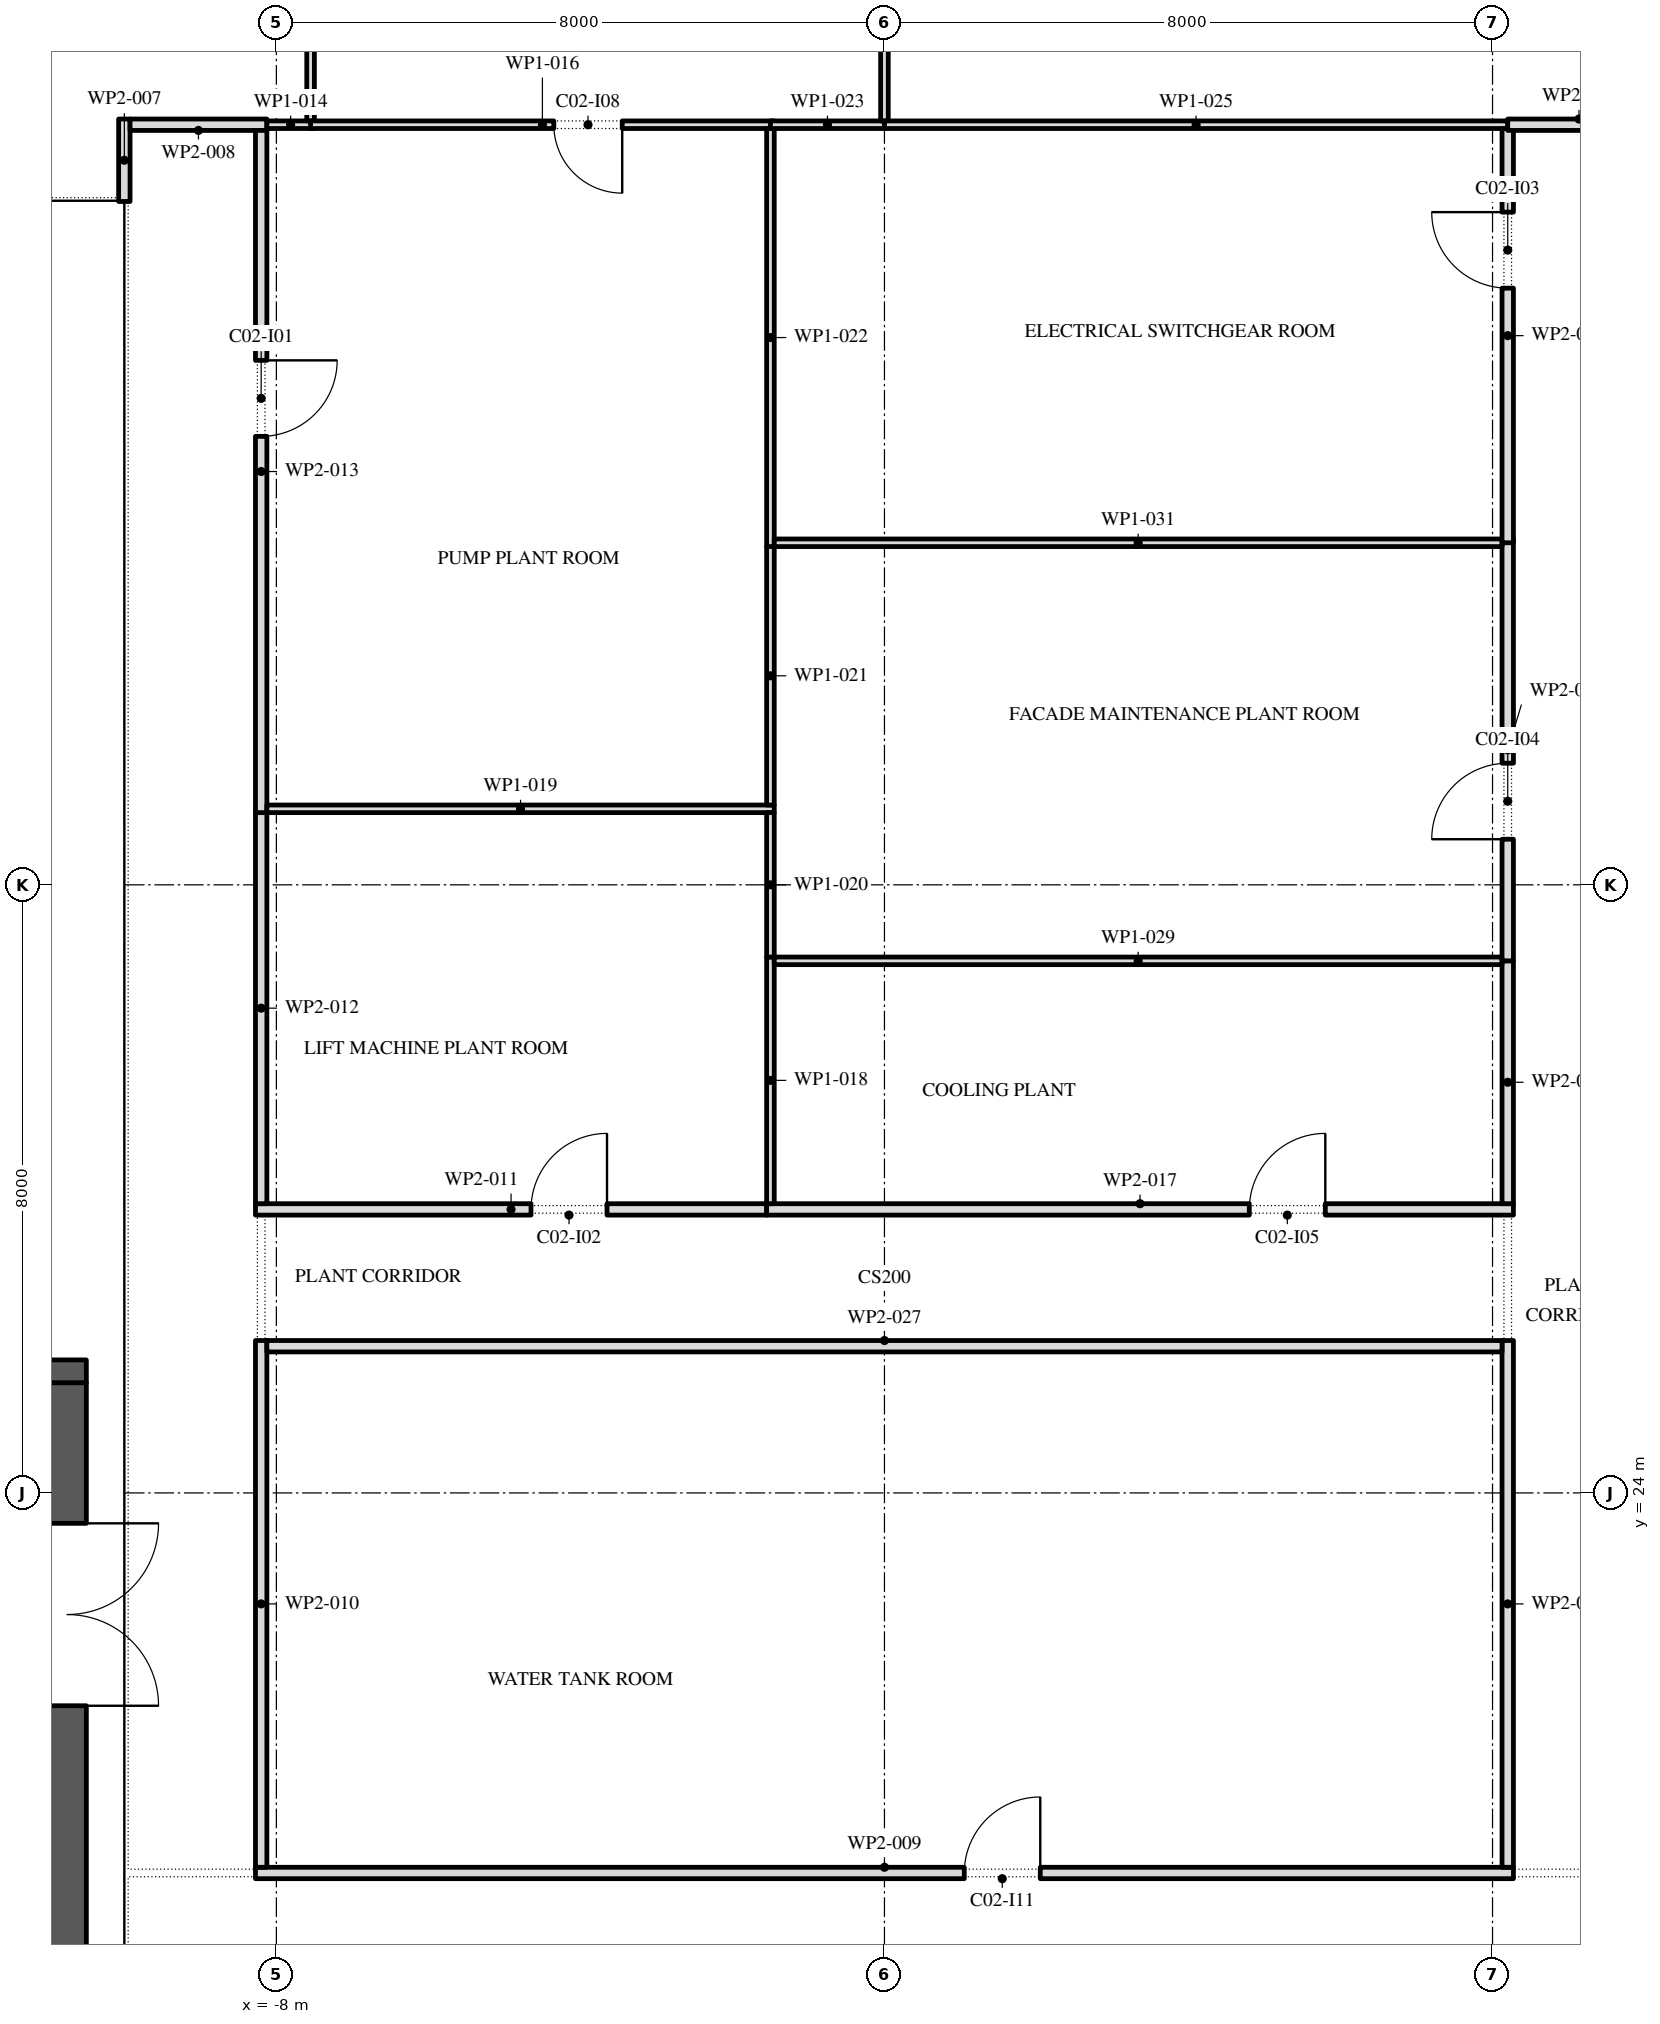
"""IFC4 building model, lengths in metres.
Left out: names, types, materials, properties, quantities, classifications, styles, units other than length and angle.
Written with IfcOpenShell. Run it as: python <this file> out.ifc"""

import sys

from ifc_helpers import new_model, si_unit, direction, frame, frame_2d, origin, place, context, subcontext, project, spatial, rectangle, extrude, element, fill, save


model = new_model("IFC4")
c1 = context("Model", 3, precision=1e-05, world=origin(), true_north=direction((0.0, 1.0)))
c2 = subcontext(c1, "Body", "Model", "MODEL_VIEW")
j1 = project(units=[si_unit("LENGTHUNIT", "METRE"), si_unit("PLANEANGLEUNIT", "RADIAN")], contexts=[c1])
p1 = place(None, origin())
s1 = spatial("IfcSite", under=j1, at=p1, CompositionType="ELEMENT")
p2 = place(p1, origin())
s2 = spatial("IfcBuilding", under=s1, at=p2, CompositionType="ELEMENT")
p3 = place(p2, frame((0.0, 0.0, 373.2)))
s3 = spatial("IfcBuildingStorey", under=s2, at=p3, CompositionType="ELEMENT", Elevation=373.2)
p4 = place(p3, frame((-10.75, -2.45, 0.0), z_axis=(0.0, 0.0, 1.0), x_axis=(0.0, 1.0, 0.0)))
e1 = element("IfcWall", 1, at=p4, inside=s3, PredefinedType="SHEAR", context=c2, shape_type="SweptSolid", body=[
    extrude(rectangle(XDim=27.9, YDim=0.5, at=frame_2d((13.95, 0.0))), origin(), (0.0, 0.0, 1.0), 4.0),
])
p5 = place(p4, frame((23.65, 0.0, 0.0)))
e2 = element("IfcOpeningElement", 2, at=p5, cuts=e1, PredefinedType="OPENING", context=c2, shape_type="SweptSolid", body=[
    extrude(rectangle(XDim=2.4, YDim=2.1, at=frame_2d((1.2, 1.05))), frame((0.0, 0.26, 0.0), z_axis=(0.0, -1.0, 0.0), x_axis=(1.0, 0.0, 0.0)), (0.0, 0.0, 1.0), 0.52),
])
p6 = place(p4, frame((1.087, 0.0, 0.0)))
e3 = element("IfcOpeningElement", 3, at=p6, cuts=e1, PredefinedType="OPENING", context=c2, shape_type="SweptSolid", body=[
    extrude(rectangle(XDim=0.9, YDim=2.1, at=frame_2d((0.45, 1.05))), frame((0.0, 0.26, 0.0), z_axis=(0.0, -1.0, 0.0), x_axis=(1.0, 0.0, 0.0)), (0.0, 0.0, 1.0), 0.52),
])
p7 = place(p4, frame((4.262, 0.0, 0.0)))
e4 = element("IfcOpeningElement", 4, at=p7, cuts=e1, PredefinedType="OPENING", context=c2, shape_type="SweptSolid", body=[
    extrude(rectangle(XDim=1.0, YDim=2.1, at=frame_2d((0.5, 1.05))), frame((0.0, 0.26, 0.0), z_axis=(0.0, -1.0, 0.0), x_axis=(1.0, 0.0, 0.0)), (0.0, 0.0, 1.0), 0.52),
])
p8 = place(p3, frame((-21.5, 25.6, 0.0), z_axis=(0.0, 0.0, 1.0), x_axis=(1.0, 0.0, 0.0)))
e5 = element("IfcWall", 5, at=p8, inside=s3, PredefinedType="SHEAR", context=c2, shape_type="SweptSolid", body=[
    extrude(rectangle(XDim=11.0, YDim=0.3, at=frame_2d((5.5, 0.0))), origin(), (0.0, 0.0, 1.0), 4.0),
])
p9 = place(p3, frame((-10.0, 40.99, 0.0), z_axis=(0.0, 0.0, 1.0), x_axis=(0.0, 1.0, 0.0)))
e6 = element("IfcWall", 6, at=p9, inside=s3, PredefinedType="PARTITIONING", context=c2, shape_type="SweptSolid", body=[
    extrude(rectangle(XDim=1.085, YDim=0.15, at=frame_2d((0.542, 0.0))), origin(), (0.0, 0.0, 1.0), 4.0),
])
p10 = place(p3, frame((-9.925, 42.0, 0.0), z_axis=(0.0, 0.0, 1.0), x_axis=(1.0, 0.0, 0.0)))
e7 = element("IfcWall", 7, at=p10, inside=s3, PredefinedType="PARTITIONING", context=c2, shape_type="SweptSolid", body=[
    extrude(rectangle(XDim=1.8, YDim=0.15, at=frame_2d((0.9, 0.0))), origin(), (0.0, 0.0, 1.0), 4.0),
])
p11 = place(p3, frame((-8.275, 19.0, 0.0), z_axis=(0.0, 0.0, 1.0), x_axis=(1.0, 0.0, 0.0)))
e8 = element("IfcWall", 8, at=p11, inside=s3, PredefinedType="PARTITIONING", context=c2, shape_type="SweptSolid", body=[
    extrude(rectangle(XDim=16.55, YDim=0.15, at=frame_2d((8.275, 0.0))), origin(), (0.0, 0.0, 1.0), 4.0),
])
p12 = place(p11, frame((9.325, 0.0, 0.0)))
e9 = element("IfcOpeningElement", 9, at=p12, cuts=e8, PredefinedType="OPENING", context=c2, shape_type="SweptSolid", body=[
    extrude(rectangle(XDim=1.0, YDim=2.1, at=frame_2d((0.5, 1.05))), frame((0.0, 0.085, 0.0), z_axis=(0.0, -1.0, 0.0), x_axis=(1.0, 0.0, 0.0)), (0.0, 0.0, 1.0), 0.17),
])
p13 = place(p3, frame((-8.2, 26.005, 0.0), z_axis=(0.0, 0.0, 1.0), x_axis=(0.0, -1.0, 0.0)))
e10 = element("IfcWall", 10, at=p13, inside=s3, PredefinedType="PARTITIONING", context=c2, shape_type="SweptSolid", body=[
    extrude(rectangle(XDim=6.93, YDim=0.15, at=frame_2d((3.465, 0.0))), origin(), (0.0, 0.0, 1.0), 4.0),
])
p14 = place(p3, frame((-8.275, 27.73, 0.0), z_axis=(0.0, 0.0, 1.0), x_axis=(1.0, 0.0, 0.0)))
e11 = element("IfcWall", 11, at=p14, inside=s3, PredefinedType="PARTITIONING", context=c2, shape_type="SweptSolid", body=[
    extrude(rectangle(XDim=6.725, YDim=0.15, at=frame_2d((3.362, 0.0))), origin(), (0.0, 0.0, 1.0), 4.0),
])
p15 = place(p14, frame((3.625, 0.0, 0.0)))
e12 = element("IfcOpeningElement", 12, at=p15, cuts=e11, PredefinedType="OPENING", context=c2, shape_type="SweptSolid", body=[
    extrude(rectangle(XDim=1.0, YDim=2.1, at=frame_2d((0.5, 1.05))), frame((0.0, 0.085, 0.0), z_axis=(0.0, -1.0, 0.0), x_axis=(1.0, 0.0, 0.0)), (0.0, 0.0, 1.0), 0.17),
])
p16 = place(p3, frame((-8.2, 32.95, 0.0), z_axis=(0.0, 0.0, 1.0), x_axis=(0.0, -1.0, 0.0)))
e13 = element("IfcWall", 13, at=p16, inside=s3, PredefinedType="PARTITIONING", context=c2, shape_type="SweptSolid", body=[
    extrude(rectangle(XDim=5.145, YDim=0.15, at=frame_2d((2.573, 0.0))), origin(), (0.0, 0.0, 1.0), 4.0),
])
p17 = place(p3, frame((-8.2, 41.925, 0.0), z_axis=(0.0, 0.0, 1.0), x_axis=(0.0, -1.0, 0.0)))
e14 = element("IfcWall", 14, at=p17, inside=s3, PredefinedType="PARTITIONING", context=c2, shape_type="SweptSolid", body=[
    extrude(rectangle(XDim=8.975, YDim=0.15, at=frame_2d((4.488, 0.0))), origin(), (0.0, 0.0, 1.0), 4.0),
])
p18 = place(p17, frame((3.025, 0.0, 0.0)))
e15 = element("IfcOpeningElement", 15, at=p18, cuts=e14, PredefinedType="OPENING", context=c2, shape_type="SweptSolid", body=[
    extrude(rectangle(XDim=1.0, YDim=2.1, at=frame_2d((0.5, 1.05))), frame((0.0, 0.085, 0.0), z_axis=(0.0, -1.0, 0.0), x_axis=(1.0, 0.0, 0.0)), (0.0, 0.0, 1.0), 0.17),
])
p19 = place(p3, frame((-8.125, 42.0, 0.0), z_axis=(0.0, 0.0, 1.0), x_axis=(1.0, 0.0, 0.0)))
e16 = element("IfcWall", 16, at=p19, inside=s3, PredefinedType="PARTITIONING", context=c2, shape_type="SweptSolid", body=[
    extrude(rectangle(XDim=0.625, YDim=0.1, at=frame_2d((0.312, 0.0))), origin(), (0.0, 0.0, 1.0), 4.0),
])
p20 = place(p3, frame((-7.55, 42.05, 0.0), z_axis=(0.0, 0.0, 1.0), x_axis=(0.0, 1.0, 0.0)))
e17 = element("IfcWall", 17, at=p20, inside=s3, PredefinedType="PARTITIONING", context=c2, shape_type="SweptSolid", body=[
    extrude(rectangle(XDim=8.378, YDim=0.1, at=frame_2d((4.189, 0.0))), origin(), (0.0, 0.0, 1.0), 4.0),
])
p21 = place(p3, frame((-7.55, 42.0, 0.0), z_axis=(0.0, 0.0, 1.0), x_axis=(1.0, 0.0, 0.0)))
e18 = element("IfcWall", 18, at=p21, inside=s3, PredefinedType="PARTITIONING", context=c2, shape_type="SweptSolid", body=[
    extrude(rectangle(XDim=6.1, YDim=0.1, at=frame_2d((3.05, 0.0))), origin(), (0.0, 0.0, 1.0), 4.0),
])
p22 = place(p21, frame((3.2, 0.0, 0.0)))
e19 = element("IfcOpeningElement", 19, at=p22, cuts=e18, PredefinedType="OPENING", context=c2, shape_type="SweptSolid", body=[
    extrude(rectangle(XDim=0.9, YDim=2.1, at=frame_2d((0.45, 1.05))), frame((0.0, 0.06, 0.0), z_axis=(0.0, -1.0, 0.0), x_axis=(1.0, 0.0, 0.0)), (0.0, 0.0, 1.0), 0.12),
])
p23 = place(p3, frame((-1.55, 27.73, 0.0), z_axis=(0.0, 0.0, 1.0), x_axis=(1.0, 0.0, 0.0)))
e20 = element("IfcWall", 20, at=p23, inside=s3, PredefinedType="PARTITIONING", context=c2, shape_type="SweptSolid", body=[
    extrude(rectangle(XDim=9.825, YDim=0.15, at=frame_2d((4.913, 0.0))), origin(), (0.0, 0.0, 1.0), 4.0),
])
p24 = place(p23, frame((6.35, 0.0, 0.0)))
e21 = element("IfcOpeningElement", 21, at=p24, cuts=e20, PredefinedType="OPENING", context=c2, shape_type="SweptSolid", body=[
    extrude(rectangle(XDim=1.0, YDim=2.1, at=frame_2d((0.5, 1.05))), frame((0.0, 0.085, 0.0), z_axis=(0.0, -1.0, 0.0), x_axis=(1.0, 0.0, 0.0)), (0.0, 0.0, 1.0), 0.17),
])
p25 = place(p3, frame((-1.5, 31.05, 0.0), z_axis=(0.0, 0.0, 1.0), x_axis=(0.0, -1.0, 0.0)))
e22 = element("IfcWall", 22, at=p25, inside=s3, PredefinedType="PARTITIONING", context=c2, shape_type="SweptSolid", body=[
    extrude(rectangle(XDim=3.245, YDim=0.1, at=frame_2d((1.623, 0.0))), origin(), (0.0, 0.0, 1.0), 4.0),
])
p26 = place(p3, frame((-1.45, 33.0, 0.0), z_axis=(0.0, 0.0, 1.0), x_axis=(-1.0, 0.0, 0.0)))
e23 = element("IfcWall", 23, at=p26, inside=s3, PredefinedType="PARTITIONING", context=c2, shape_type="SweptSolid", body=[
    extrude(rectangle(XDim=6.675, YDim=0.1, at=frame_2d((3.337, 0.0))), origin(), (0.0, 0.0, 1.0), 4.0),
])
p27 = place(p3, frame((-1.5, 32.95, 0.0), z_axis=(0.0, 0.0, 1.0), x_axis=(0.0, -1.0, 0.0)))
e24 = element("IfcWall", 24, at=p27, inside=s3, PredefinedType="PARTITIONING", context=c2, shape_type="SweptSolid", body=[
    extrude(rectangle(XDim=1.9, YDim=0.1, at=frame_2d((0.95, 0.0))), origin(), (0.0, 0.0, 1.0), 4.0),
])
p28 = place(p3, frame((-1.5, 36.45, 0.0), z_axis=(0.0, 0.0, 1.0), x_axis=(0.0, -1.0, 0.0)))
e25 = element("IfcWall", 25, at=p28, inside=s3, PredefinedType="PARTITIONING", context=c2, shape_type="SweptSolid", body=[
    extrude(rectangle(XDim=3.4, YDim=0.1, at=frame_2d((1.7, 0.0))), origin(), (0.0, 0.0, 1.0), 4.0),
])
p29 = place(p3, frame((-1.5, 41.95, 0.0), z_axis=(0.0, 0.0, 1.0), x_axis=(0.0, -1.0, 0.0)))
e26 = element("IfcWall", 26, at=p29, inside=s3, PredefinedType="PARTITIONING", context=c2, shape_type="SweptSolid", body=[
    extrude(rectangle(XDim=5.5, YDim=0.1, at=frame_2d((2.75, 0.0))), origin(), (0.0, 0.0, 1.0), 4.0),
])
p30 = place(p3, frame((-1.5, 42.0, 0.0), z_axis=(0.0, 0.0, 1.0), x_axis=(1.0, 0.0, 0.0)))
e27 = element("IfcWall", 27, at=p30, inside=s3, PredefinedType="PARTITIONING", context=c2, shape_type="SweptSolid", body=[
    extrude(rectangle(XDim=1.5, YDim=0.1, at=frame_2d((0.75, 0.0))), origin(), (0.0, 0.0, 1.0), 4.0),
])
p31 = place(p3, frame((0.0, 42.05, 0.0), z_axis=(0.0, 0.0, 1.0), x_axis=(0.0, 1.0, 0.0)))
e28 = element("IfcWall", 28, at=p31, inside=s3, PredefinedType="PARTITIONING", context=c2, shape_type="SweptSolid", body=[
    extrude(rectangle(XDim=8.378, YDim=0.1, at=frame_2d((4.189, 0.0))), origin(), (0.0, 0.0, 1.0), 4.0),
])
p32 = place(p3, frame((0.0, 42.0, 0.0), z_axis=(0.0, 0.0, 1.0), x_axis=(1.0, 0.0, 0.0)))
e29 = element("IfcWall", 29, at=p32, inside=s3, PredefinedType="PARTITIONING", context=c2, shape_type="SweptSolid", body=[
    extrude(rectangle(XDim=8.2, YDim=0.1, at=frame_2d((4.1, 0.0))), origin(), (0.0, 0.0, 1.0), 4.0),
])
p33 = place(p3, frame((8.2, 19.075, 0.0), z_axis=(0.0, 0.0, 1.0), x_axis=(0.0, 1.0, 0.0)))
e30 = element("IfcWall", 30, at=p33, inside=s3, PredefinedType="PARTITIONING", context=c2, shape_type="SweptSolid", body=[
    extrude(rectangle(XDim=6.93, YDim=0.15, at=frame_2d((3.465, 0.0))), origin(), (0.0, 0.0, 1.0), 4.0),
])
p34 = place(p3, frame((8.125, 25.93, 0.0), z_axis=(0.0, 0.0, 1.0), x_axis=(-1.0, 0.0, 0.0)))
e31 = element("IfcWall", 31, at=p34, inside=s3, PredefinedType="PARTITIONING", context=c2, shape_type="SweptSolid", body=[
    extrude(rectangle(XDim=16.25, YDim=0.15, at=frame_2d((8.125, 0.0))), origin(), (0.0, 0.0, 1.0), 4.0),
])
p35 = place(p3, frame((8.2, 27.805, 0.0), z_axis=(0.0, 0.0, 1.0), x_axis=(0.0, 1.0, 0.0)))
e32 = element("IfcWall", 32, at=p35, inside=s3, PredefinedType="PARTITIONING", context=c2, shape_type="SweptSolid", body=[
    extrude(rectangle(XDim=3.195, YDim=0.15, at=frame_2d((1.598, 0.0))), origin(), (0.0, 0.0, 1.0), 4.0),
])
p36 = place(p3, frame((8.125, 31.0, 0.0), z_axis=(0.0, 0.0, 1.0), x_axis=(-1.0, 0.0, 0.0)))
e33 = element("IfcWall", 33, at=p36, inside=s3, PredefinedType="PARTITIONING", context=c2, shape_type="SweptSolid", body=[
    extrude(rectangle(XDim=9.575, YDim=0.1, at=frame_2d((4.788, 0.0))), origin(), (0.0, 0.0, 1.0), 4.0),
])
p37 = place(p3, frame((8.2, 31.0, 0.0), z_axis=(0.0, 0.0, 1.0), x_axis=(0.0, 1.0, 0.0)))
e34 = element("IfcWall", 34, at=p37, inside=s3, PredefinedType="PARTITIONING", context=c2, shape_type="SweptSolid", body=[
    extrude(rectangle(XDim=5.55, YDim=0.15, at=frame_2d((2.775, 0.0))), origin(), (0.0, 0.0, 1.0), 4.0),
])
p38 = place(p37, frame((1.6, 0.0, 0.0)))
e35 = element("IfcOpeningElement", 35, at=p38, cuts=e34, PredefinedType="OPENING", context=c2, shape_type="SweptSolid", body=[
    extrude(rectangle(XDim=1.0, YDim=2.1, at=frame_2d((0.5, 1.05))), frame((0.0, 0.085, 0.0), z_axis=(0.0, -1.0, 0.0), x_axis=(1.0, 0.0, 0.0)), (0.0, 0.0, 1.0), 0.17),
])
p39 = place(p3, frame((8.125, 36.5, 0.0), z_axis=(0.0, 0.0, 1.0), x_axis=(-1.0, 0.0, 0.0)))
e36 = element("IfcWall", 36, at=p39, inside=s3, PredefinedType="PARTITIONING", context=c2, shape_type="SweptSolid", body=[
    extrude(rectangle(XDim=9.575, YDim=0.1, at=frame_2d((4.788, 0.0))), origin(), (0.0, 0.0, 1.0), 4.0),
])
p40 = place(p3, frame((8.2, 36.5, 0.0), z_axis=(0.0, 0.0, 1.0), x_axis=(0.0, 1.0, 0.0)))
e37 = element("IfcWall", 37, at=p40, inside=s3, PredefinedType="PARTITIONING", context=c2, shape_type="SweptSolid", body=[
    extrude(rectangle(XDim=5.45, YDim=0.15, at=frame_2d((2.725, 0.0))), origin(), (0.0, 0.0, 1.0), 4.0),
])
p41 = place(p40, frame((3.35, 0.0, 0.0)))
e38 = element("IfcOpeningElement", 38, at=p41, cuts=e37, PredefinedType="OPENING", context=c2, shape_type="SweptSolid", body=[
    extrude(rectangle(XDim=1.0, YDim=2.1, at=frame_2d((0.5, 1.05))), frame((0.0, 0.085, 0.0), z_axis=(0.0, -1.0, 0.0), x_axis=(1.0, 0.0, 0.0)), (0.0, 0.0, 1.0), 0.17),
])
p42 = place(p3, frame((8.2, 42.0, 0.0), z_axis=(0.0, 0.0, 1.0), x_axis=(1.0, 0.0, 0.0)))
e39 = element("IfcWall", 39, at=p42, inside=s3, PredefinedType="PARTITIONING", context=c2, shape_type="SweptSolid", body=[
    extrude(rectangle(XDim=1.875, YDim=0.15, at=frame_2d((0.938, 0.0))), origin(), (0.0, 0.0, 1.0), 4.0),
])
p43 = place(p5, frame((2.4, 0.0, 0.0), z_axis=(0.0, 0.0, 1.0), x_axis=(-1.0, 0.0, 0.0)))
e40 = element("IfcDoor", 40, at=p43, inside=s3, OperationType="DOUBLE_DOOR_SINGLE_SWING", PredefinedType="DOOR", context=c2, shape_type="SweptSolid", body=[
    extrude(rectangle(XDim=2.4, YDim=2.1, at=frame_2d((1.2, 1.05))), frame((0.0, 0.025, 0.0), z_axis=(0.0, -1.0, 0.0), x_axis=(1.0, 0.0, 0.0)), (0.0, 0.0, 1.0), 0.05),
])
fill(e2, e40)
p44 = place(p18, origin())
e41 = element("IfcDoor", 41, at=p44, inside=s3, OperationType="SINGLE_SWING_RIGHT", PredefinedType="DOOR", context=c2, shape_type="SweptSolid", body=[
    extrude(rectangle(XDim=1.0, YDim=2.1, at=frame_2d((0.5, 1.05))), frame((0.0, 0.025, 0.0), z_axis=(0.0, -1.0, 0.0), x_axis=(1.0, 0.0, 0.0)), (0.0, 0.0, 1.0), 0.05),
])
fill(e15, e41)
p45 = place(p15, origin())
e42 = element("IfcDoor", 42, at=p45, inside=s3, OperationType="SINGLE_SWING_LEFT", PredefinedType="DOOR", context=c2, shape_type="SweptSolid", body=[
    extrude(rectangle(XDim=1.0, YDim=2.1, at=frame_2d((0.5, 1.05))), frame((0.0, 0.025, 0.0), z_axis=(0.0, -1.0, 0.0), x_axis=(1.0, 0.0, 0.0)), (0.0, 0.0, 1.0), 0.05),
])
fill(e12, e42)
p46 = place(p41, origin())
e43 = element("IfcDoor", 43, at=p46, inside=s3, OperationType="SINGLE_SWING_LEFT", PredefinedType="DOOR", context=c2, shape_type="SweptSolid", body=[
    extrude(rectangle(XDim=1.0, YDim=2.1, at=frame_2d((0.5, 1.05))), frame((0.0, 0.025, 0.0), z_axis=(0.0, -1.0, 0.0), x_axis=(1.0, 0.0, 0.0)), (0.0, 0.0, 1.0), 0.05),
])
fill(e38, e43)
p47 = place(p38, origin())
e44 = element("IfcDoor", 44, at=p47, inside=s3, OperationType="SINGLE_SWING_RIGHT", PredefinedType="DOOR", context=c2, shape_type="SweptSolid", body=[
    extrude(rectangle(XDim=1.0, YDim=2.1, at=frame_2d((0.5, 1.05))), frame((0.0, 0.025, 0.0), z_axis=(0.0, -1.0, 0.0), x_axis=(1.0, 0.0, 0.0)), (0.0, 0.0, 1.0), 0.05),
])
fill(e35, e44)
p48 = place(p24, origin())
e45 = element("IfcDoor", 45, at=p48, inside=s3, OperationType="SINGLE_SWING_LEFT", PredefinedType="DOOR", context=c2, shape_type="SweptSolid", body=[
    extrude(rectangle(XDim=1.0, YDim=2.1, at=frame_2d((0.5, 1.05))), frame((0.0, 0.025, 0.0), z_axis=(0.0, -1.0, 0.0), x_axis=(1.0, 0.0, 0.0)), (0.0, 0.0, 1.0), 0.05),
])
fill(e21, e45)
p49 = place(p22, frame((0.9, 0.0, 0.0), z_axis=(0.0, 0.0, 1.0), x_axis=(-1.0, 0.0, 0.0)))
e46 = element("IfcDoor", 46, at=p49, inside=s3, OperationType="SINGLE_SWING_RIGHT", PredefinedType="DOOR", context=c2, shape_type="SweptSolid", body=[
    extrude(rectangle(XDim=0.9, YDim=2.1, at=frame_2d((0.45, 1.05))), frame((0.0, 0.025, 0.0), z_axis=(0.0, -1.0, 0.0), x_axis=(1.0, 0.0, 0.0)), (0.0, 0.0, 1.0), 0.05),
])
fill(e19, e46)
p50 = place(p12, origin())
e47 = element("IfcDoor", 47, at=p50, inside=s3, OperationType="SINGLE_SWING_LEFT", PredefinedType="DOOR", context=c2, shape_type="SweptSolid", body=[
    extrude(rectangle(XDim=1.0, YDim=2.1, at=frame_2d((0.5, 1.05))), frame((0.0, 0.025, 0.0), z_axis=(0.0, -1.0, 0.0), x_axis=(1.0, 0.0, 0.0)), (0.0, 0.0, 1.0), 0.05),
])
fill(e9, e47)
save(model, sys.argv[1])
